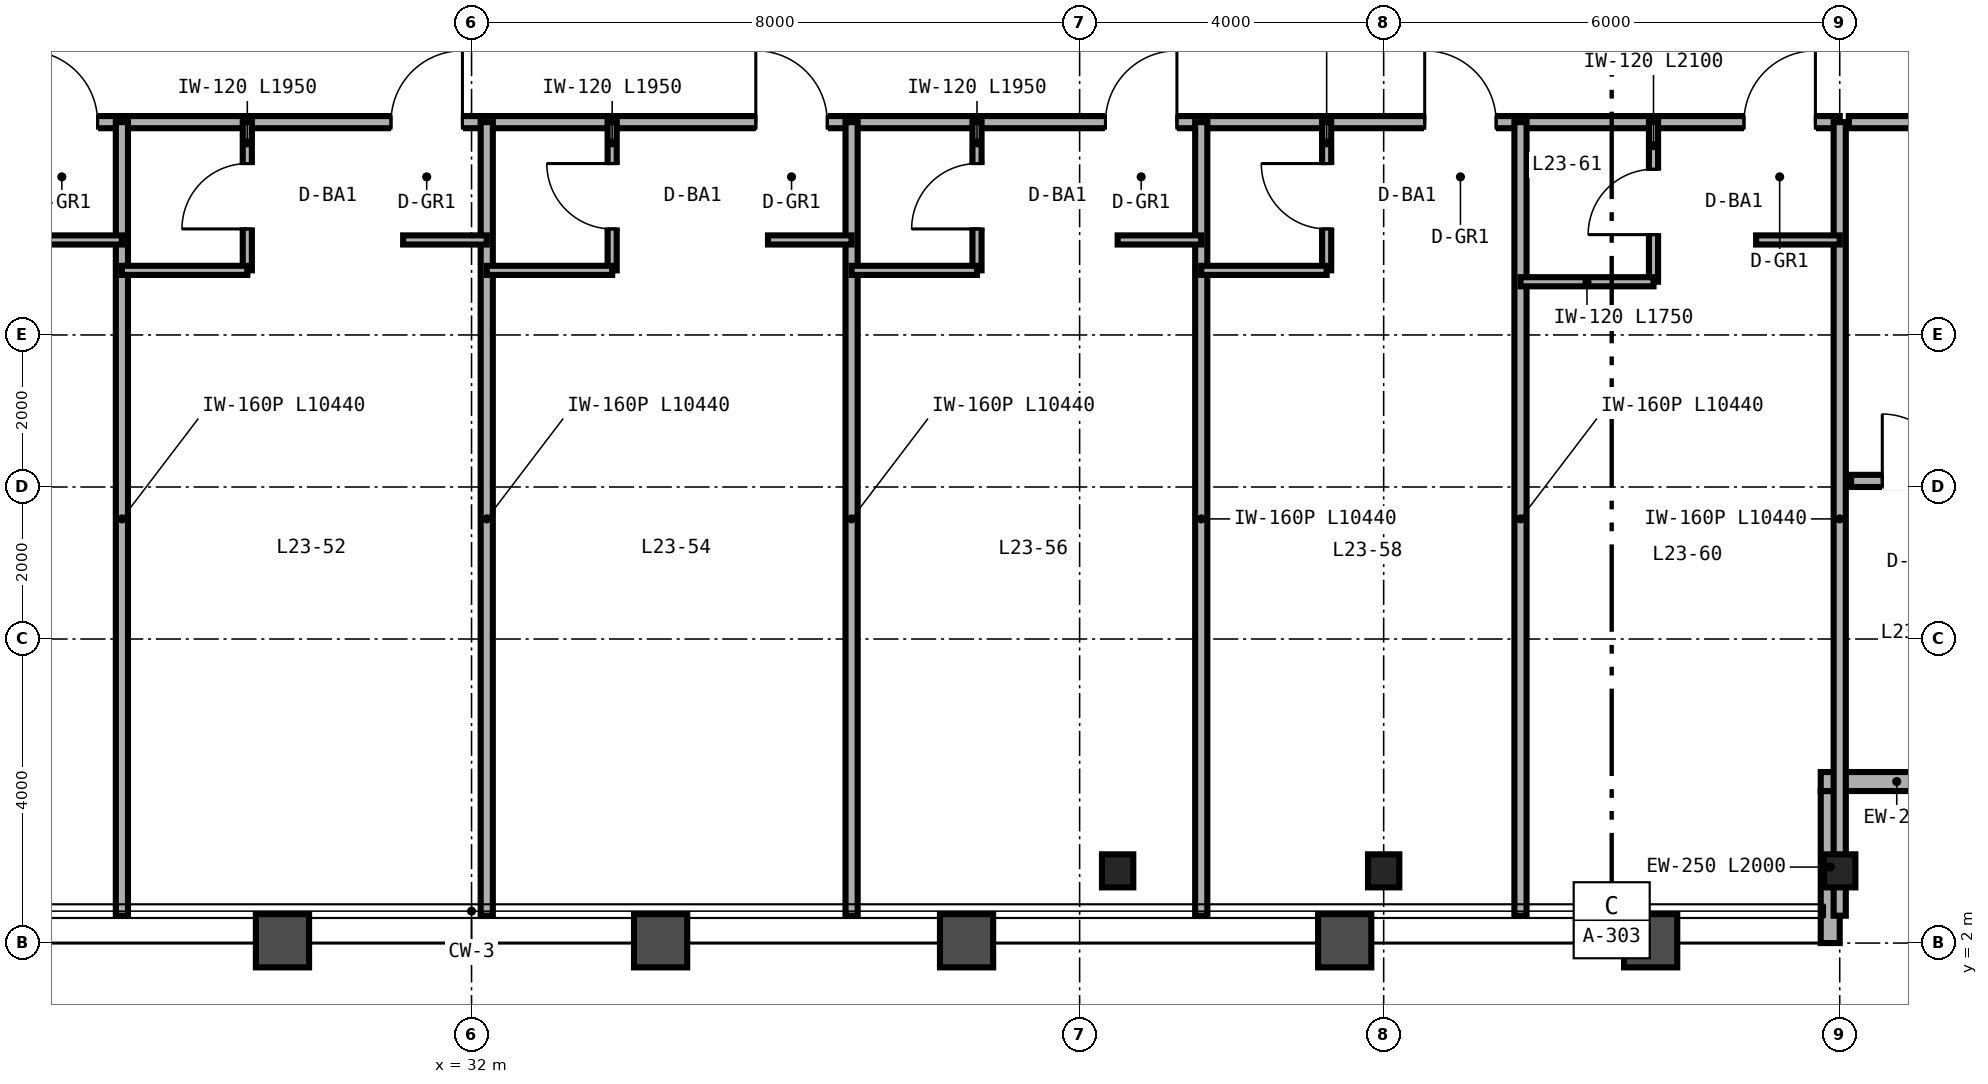
"""IFC4 building model, lengths in metres.
Left out: names, types, materials, properties, quantities, classifications, styles, units other than length and angle.
Written with IfcOpenShell. Run it as: python <this file> out.ifc"""

import sys

from ifc_helpers import new_model, si_unit, direction, frame, frame_2d, origin, origin_2d, place, context, subcontext, project, spatial, rectangle, i_section, extrude, source, transform, mapped, element, fill, save


model = new_model("IFC4")
c1 = context("Model", 3, precision=1e-05, world=origin(), true_north=direction((0.0, 1.0)))
c2 = subcontext(c1, "Body", "Model", "MODEL_VIEW")
j1 = project(units=[si_unit("LENGTHUNIT", "METRE"), si_unit("PLANEANGLEUNIT", "RADIAN")], contexts=[c1])
p1 = place(None, origin())
s1 = spatial("IfcSite", under=j1, at=p1, CompositionType="ELEMENT")
p2 = place(p1, origin())
s2 = spatial("IfcBuilding", under=s1, at=p2, CompositionType="ELEMENT")
p3 = place(p2, frame((0.0, 0.0, 97.2)))
s3 = spatial("IfcBuildingStorey", under=s2, at=p3, CompositionType="ELEMENT", Elevation=97.2)
m1 = source(origin(), c2, "Body", "SweptSolid", [
    extrude(i_section(OverallWidth=0.412, OverallDepth=0.435, WebThickness=0.036, FlangeThickness=0.057, FilletRadius=0.025, at=origin_2d()), origin(), (0.0, 0.0, 1.0), 3.36),
])
for number, where, z_axis, x_axis in (
    (1, (40.5, 2.95, 0.0), (0.0, 0.0, 1.0), (1.0, 0.0, 0.0)),
    (2, (44.0, 2.95, 0.0), (0.0, 0.0, 1.0), (1.0, 0.0, 0.0)),
    (3, (50.0, 2.95, 0.0), (0.0, 0.0, 1.0), (1.0, 0.0, 0.0)),
):
    element("IfcColumn", number, at=place(p3, frame(where, z_axis=z_axis, x_axis=x_axis)), inside=s3, PredefinedType="COLUMN", context=c2, shape_type="MappedRepresentation", body=[
        mapped(m1, transform((0.0, 0.0, 0.0), scale=1.0)),
    ])
p4 = place(p3, frame((49.875, 2.0, 0.0), z_axis=(0.0, 0.0, 1.0), x_axis=(0.0, 1.0, 0.0)))
e4 = element("IfcWall", 4, at=p4, inside=s3, PredefinedType="SOLIDWALL", context=c2, shape_type="SweptSolid", body=[
    extrude(rectangle(XDim=2.0, YDim=0.25, at=frame_2d((1.0, 0.0))), origin(), (0.0, 0.0, 1.0), 2.667),
])
p5 = place(p3, frame((49.75, 4.125, 0.0), z_axis=(0.0, 0.0, 1.0), x_axis=(1.0, 0.0, 0.0)))
e5 = element("IfcWall", 5, at=p5, inside=s3, PredefinedType="SOLIDWALL", context=c2, shape_type="SweptSolid", body=[
    extrude(rectangle(XDim=2.0, YDim=0.25, at=frame_2d((1.0, 0.0))), origin(), (0.0, 0.0, 1.0), 3.36),
])
p6 = place(p3, frame((50.12, 12.8, 0.0), z_axis=(0.0, 0.0, 1.0), x_axis=(1.0, 0.0, 0.0)))
e6 = element("IfcWall", 6, at=p6, inside=s3, PredefinedType="PARTITIONING", context=c2, shape_type="SweptSolid", body=[
    extrude(rectangle(XDim=5.68, YDim=0.16, at=frame_2d((2.84, 0.0))), origin(), (0.0, 0.0, 1.0), 3.36),
])
p7 = place(p6, frame((2.36, 0.0, 0.0)))
e7 = element("IfcOpeningElement", 7, at=p7, cuts=e6, PredefinedType="OPENING", context=c2, shape_type="SweptSolid", body=[
    extrude(rectangle(XDim=0.96, YDim=2.15, at=frame_2d((0.48, 1.075))), frame((0.0, 0.09, 0.0), z_axis=(0.0, -1.0, 0.0), x_axis=(1.0, 0.0, 0.0)), (0.0, 0.0, 1.0), 0.18),
])
p8 = place(p3, frame((50.15, 8.08, 0.0), z_axis=(0.0, 0.0, 1.0), x_axis=(1.0, 0.0, 0.0)))
e8 = element("IfcWall", 8, at=p8, inside=s3, PredefinedType="PARTITIONING", context=c2, shape_type="SweptSolid", body=[
    extrude(rectangle(XDim=1.7, YDim=0.16, at=frame_2d((0.85, 0.0))), origin(), (0.0, 0.0, 1.0), 3.36),
])
p9 = place(p8, frame((0.41, 0.0, 0.0)))
e9 = element("IfcOpeningElement", 9, at=p9, cuts=e8, PredefinedType="OPENING", context=c2, shape_type="SweptSolid", body=[
    extrude(rectangle(XDim=0.88, YDim=2.15, at=frame_2d((0.44, 1.075))), frame((0.0, 0.09, 0.0), z_axis=(0.0, -1.0, 0.0), x_axis=(1.0, 0.0, 0.0)), (0.0, 0.0, 1.0), 0.18),
])
p10 = place(p3, frame((14.0, 12.8, 0.0), z_axis=(0.0, 0.0, 1.0), x_axis=(1.0, 0.0, 0.0)))
e10 = element("IfcWall", 10, at=p10, inside=s3, PredefinedType="PARTITIONING", context=c2, shape_type="SweptSolid", body=[
    extrude(rectangle(XDim=36.0, YDim=0.16, at=frame_2d((18.0, 0.0))), origin(), (0.0, 0.0, 1.0), 2.581),
])
p11 = place(p10, frame((3.14, 0.0, 0.0)))
e11 = element("IfcOpeningElement", 11, at=p11, cuts=e10, PredefinedType="OPENING", context=c2, shape_type="SweptSolid", body=[
    extrude(rectangle(XDim=0.94, YDim=2.15, at=frame_2d((0.47, 1.075))), frame((0.0, 0.09, 0.0), z_axis=(0.0, -1.0, 0.0), x_axis=(1.0, 0.0, 0.0)), (0.0, 0.0, 1.0), 0.18),
])
p12 = place(p10, frame((7.54, 0.0, 0.0)))
e12 = element("IfcOpeningElement", 12, at=p12, cuts=e10, PredefinedType="OPENING", context=c2, shape_type="SweptSolid", body=[
    extrude(rectangle(XDim=0.94, YDim=2.15, at=frame_2d((0.47, 1.075))), frame((0.0, 0.09, 0.0), z_axis=(0.0, -1.0, 0.0), x_axis=(1.0, 0.0, 0.0)), (0.0, 0.0, 1.0), 0.18),
])
p13 = place(p10, frame((12.14, 0.0, 0.0)))
e13 = element("IfcOpeningElement", 13, at=p13, cuts=e10, PredefinedType="OPENING", context=c2, shape_type="SweptSolid", body=[
    extrude(rectangle(XDim=0.94, YDim=2.15, at=frame_2d((0.47, 1.075))), frame((0.0, 0.09, 0.0), z_axis=(0.0, -1.0, 0.0), x_axis=(1.0, 0.0, 0.0)), (0.0, 0.0, 1.0), 0.18),
])
p14 = place(p10, frame((16.94, 0.0, 0.0)))
e14 = element("IfcOpeningElement", 14, at=p14, cuts=e10, PredefinedType="OPENING", context=c2, shape_type="SweptSolid", body=[
    extrude(rectangle(XDim=0.94, YDim=2.15, at=frame_2d((0.47, 1.075))), frame((0.0, 0.09, 0.0), z_axis=(0.0, -1.0, 0.0), x_axis=(1.0, 0.0, 0.0)), (0.0, 0.0, 1.0), 0.18),
])
p15 = place(p10, frame((21.74, 0.0, 0.0)))
e15 = element("IfcOpeningElement", 15, at=p15, cuts=e10, PredefinedType="OPENING", context=c2, shape_type="SweptSolid", body=[
    extrude(rectangle(XDim=0.94, YDim=2.15, at=frame_2d((0.47, 1.075))), frame((0.0, 0.09, 0.0), z_axis=(0.0, -1.0, 0.0), x_axis=(1.0, 0.0, 0.0)), (0.0, 0.0, 1.0), 0.18),
])
p16 = place(p10, frame((26.34, 0.0, 0.0)))
e16 = element("IfcOpeningElement", 16, at=p16, cuts=e10, PredefinedType="OPENING", context=c2, shape_type="SweptSolid", body=[
    extrude(rectangle(XDim=0.94, YDim=2.15, at=frame_2d((0.47, 1.075))), frame((0.0, 0.09, 0.0), z_axis=(0.0, -1.0, 0.0), x_axis=(1.0, 0.0, 0.0)), (0.0, 0.0, 1.0), 0.18),
])
p17 = place(p10, frame((30.54, 0.0, 0.0)))
e17 = element("IfcOpeningElement", 17, at=p17, cuts=e10, PredefinedType="OPENING", context=c2, shape_type="SweptSolid", body=[
    extrude(rectangle(XDim=0.94, YDim=2.15, at=frame_2d((0.47, 1.075))), frame((0.0, 0.09, 0.0), z_axis=(0.0, -1.0, 0.0), x_axis=(1.0, 0.0, 0.0)), (0.0, 0.0, 1.0), 0.18),
])
p18 = place(p10, frame((34.74, 0.0, 0.0)))
e18 = element("IfcOpeningElement", 18, at=p18, cuts=e10, PredefinedType="OPENING", context=c2, shape_type="SweptSolid", body=[
    extrude(rectangle(XDim=0.94, YDim=2.15, at=frame_2d((0.47, 1.075))), frame((0.0, 0.09, 0.0), z_axis=(0.0, -1.0, 0.0), x_axis=(1.0, 0.0, 0.0)), (0.0, 0.0, 1.0), 0.18),
])
p19 = place(p3, frame((50.0, 2.36, 0.0), z_axis=(0.0, 0.0, 1.0), x_axis=(0.0, 1.0, 0.0)))
e19 = element("IfcWall", 19, at=p19, inside=s3, PredefinedType="PARTITIONING", context=c2, shape_type="SweptSolid", body=[
    extrude(rectangle(XDim=10.44, YDim=0.16, at=frame_2d((5.22, 0.0))), origin(), (0.0, 0.0, 1.0), 2.667),
])
p20 = place(p3, frame((27.4, 2.36, 0.0), z_axis=(0.0, 0.0, 1.0), x_axis=(0.0, 1.0, 0.0)))
e20 = element("IfcWall", 20, at=p20, inside=s3, PredefinedType="PARTITIONING", context=c2, shape_type="SweptSolid", body=[
    extrude(rectangle(XDim=10.44, YDim=0.16, at=frame_2d((5.22, 0.0))), origin(), (0.0, 0.0, 1.0), 2.433),
])
p21 = place(p3, frame((26.3, 11.25, 0.0), z_axis=(0.0, 0.0, 1.0), x_axis=(1.0, 0.0, 0.0)))
e21 = element("IfcWall", 21, at=p21, inside=s3, PredefinedType="PARTITIONING", context=c2, shape_type="SweptSolid", body=[
    extrude(rectangle(XDim=1.1, YDim=0.12, at=frame_2d((0.55, 0.0))), origin(), (0.0, 0.0, 1.0), 3.36),
])
p22 = place(p3, frame((32.2, 2.36, 0.0), z_axis=(0.0, 0.0, 1.0), x_axis=(0.0, 1.0, 0.0)))
e22 = element("IfcWall", 22, at=p22, inside=s3, PredefinedType="PARTITIONING", context=c2, shape_type="SweptSolid", body=[
    extrude(rectangle(XDim=10.44, YDim=0.16, at=frame_2d((5.22, 0.0))), origin(), (0.0, 0.0, 1.0), 2.433),
])
p23 = place(p3, frame((29.05, 10.85, 0.0), z_axis=(0.0, 0.0, 1.0), x_axis=(0.0, 1.0, 0.0)))
e23 = element("IfcWall", 23, at=p23, inside=s3, PredefinedType="PARTITIONING", context=c2, shape_type="SweptSolid", body=[
    extrude(rectangle(XDim=1.95, YDim=0.12, at=frame_2d((0.975, 0.0))), origin(), (0.0, 0.0, 1.0), 3.36),
])
p24 = place(p23, frame((0.545, 0.0, 0.0)))
e24 = element("IfcOpeningElement", 24, at=p24, cuts=e23, PredefinedType="OPENING", context=c2, shape_type="SweptSolid", body=[
    extrude(rectangle(XDim=0.86, YDim=2.1, at=frame_2d((0.43, 1.05))), frame((0.0, 0.07, 0.0), z_axis=(0.0, -1.0, 0.0), x_axis=(1.0, 0.0, 0.0)), (0.0, 0.0, 1.0), 0.14),
])
p25 = place(p3, frame((27.4, 10.85, 0.0), z_axis=(0.0, 0.0, 1.0), x_axis=(1.0, 0.0, 0.0)))
e25 = element("IfcWall", 25, at=p25, inside=s3, PredefinedType="PARTITIONING", context=c2, shape_type="SweptSolid", body=[
    extrude(rectangle(XDim=1.65, YDim=0.12, at=frame_2d((0.825, 0.0))), origin(), (0.0, 0.0, 1.0), 3.36),
])
p26 = place(p3, frame((31.1, 11.25, 0.0), z_axis=(0.0, 0.0, 1.0), x_axis=(1.0, 0.0, 0.0)))
e26 = element("IfcWall", 26, at=p26, inside=s3, PredefinedType="PARTITIONING", context=c2, shape_type="SweptSolid", body=[
    extrude(rectangle(XDim=1.1, YDim=0.12, at=frame_2d((0.55, 0.0))), origin(), (0.0, 0.0, 1.0), 3.36),
])
p27 = place(p3, frame((37.0, 2.36, 0.0), z_axis=(0.0, 0.0, 1.0), x_axis=(0.0, 1.0, 0.0)))
e27 = element("IfcWall", 27, at=p27, inside=s3, PredefinedType="PARTITIONING", context=c2, shape_type="SweptSolid", body=[
    extrude(rectangle(XDim=10.44, YDim=0.16, at=frame_2d((5.22, 0.0))), origin(), (0.0, 0.0, 1.0), 2.433),
])
p28 = place(p3, frame((33.85, 10.85, 0.0), z_axis=(0.0, 0.0, 1.0), x_axis=(0.0, 1.0, 0.0)))
e28 = element("IfcWall", 28, at=p28, inside=s3, PredefinedType="PARTITIONING", context=c2, shape_type="SweptSolid", body=[
    extrude(rectangle(XDim=1.95, YDim=0.12, at=frame_2d((0.975, 0.0))), origin(), (0.0, 0.0, 1.0), 3.36),
])
p29 = place(p28, frame((0.545, 0.0, 0.0)))
e29 = element("IfcOpeningElement", 29, at=p29, cuts=e28, PredefinedType="OPENING", context=c2, shape_type="SweptSolid", body=[
    extrude(rectangle(XDim=0.86, YDim=2.1, at=frame_2d((0.43, 1.05))), frame((0.0, 0.07, 0.0), z_axis=(0.0, -1.0, 0.0), x_axis=(1.0, 0.0, 0.0)), (0.0, 0.0, 1.0), 0.14),
])
p30 = place(p3, frame((32.2, 10.85, 0.0), z_axis=(0.0, 0.0, 1.0), x_axis=(1.0, 0.0, 0.0)))
e30 = element("IfcWall", 30, at=p30, inside=s3, PredefinedType="PARTITIONING", context=c2, shape_type="SweptSolid", body=[
    extrude(rectangle(XDim=1.65, YDim=0.12, at=frame_2d((0.825, 0.0))), origin(), (0.0, 0.0, 1.0), 3.36),
])
p31 = place(p3, frame((35.9, 11.25, 0.0), z_axis=(0.0, 0.0, 1.0), x_axis=(1.0, 0.0, 0.0)))
e31 = element("IfcWall", 31, at=p31, inside=s3, PredefinedType="PARTITIONING", context=c2, shape_type="SweptSolid", body=[
    extrude(rectangle(XDim=1.1, YDim=0.12, at=frame_2d((0.55, 0.0))), origin(), (0.0, 0.0, 1.0), 3.36),
])
p32 = place(p3, frame((41.6, 2.36, 0.0), z_axis=(0.0, 0.0, 1.0), x_axis=(0.0, 1.0, 0.0)))
e32 = element("IfcWall", 32, at=p32, inside=s3, PredefinedType="PARTITIONING", context=c2, shape_type="SweptSolid", body=[
    extrude(rectangle(XDim=10.44, YDim=0.16, at=frame_2d((5.22, 0.0))), origin(), (0.0, 0.0, 1.0), 2.823),
])
p33 = place(p3, frame((38.65, 10.85, 0.0), z_axis=(0.0, 0.0, 1.0), x_axis=(0.0, 1.0, 0.0)))
e33 = element("IfcWall", 33, at=p33, inside=s3, PredefinedType="PARTITIONING", context=c2, shape_type="SweptSolid", body=[
    extrude(rectangle(XDim=1.95, YDim=0.12, at=frame_2d((0.975, 0.0))), origin(), (0.0, 0.0, 1.0), 3.36),
])
p34 = place(p33, frame((0.545, 0.0, 0.0)))
e34 = element("IfcOpeningElement", 34, at=p34, cuts=e33, PredefinedType="OPENING", context=c2, shape_type="SweptSolid", body=[
    extrude(rectangle(XDim=0.86, YDim=2.1, at=frame_2d((0.43, 1.05))), frame((0.0, 0.07, 0.0), z_axis=(0.0, -1.0, 0.0), x_axis=(1.0, 0.0, 0.0)), (0.0, 0.0, 1.0), 0.14),
])
p35 = place(p3, frame((37.0, 10.85, 0.0), z_axis=(0.0, 0.0, 1.0), x_axis=(1.0, 0.0, 0.0)))
e35 = element("IfcWall", 35, at=p35, inside=s3, PredefinedType="PARTITIONING", context=c2, shape_type="SweptSolid", body=[
    extrude(rectangle(XDim=1.65, YDim=0.12, at=frame_2d((0.825, 0.0))), origin(), (0.0, 0.0, 1.0), 3.36),
])
p36 = place(p3, frame((40.5, 11.25, 0.0), z_axis=(0.0, 0.0, 1.0), x_axis=(1.0, 0.0, 0.0)))
e36 = element("IfcWall", 36, at=p36, inside=s3, PredefinedType="PARTITIONING", context=c2, shape_type="SweptSolid", body=[
    extrude(rectangle(XDim=1.1, YDim=0.12, at=frame_2d((0.55, 0.0))), origin(), (0.0, 0.0, 1.0), 2.581),
])
p37 = place(p3, frame((45.8, 2.36, 0.0), z_axis=(0.0, 0.0, 1.0), x_axis=(0.0, 1.0, 0.0)))
e37 = element("IfcWall", 37, at=p37, inside=s3, PredefinedType="PARTITIONING", context=c2, shape_type="SweptSolid", body=[
    extrude(rectangle(XDim=10.44, YDim=0.16, at=frame_2d((5.22, 0.0))), origin(), (0.0, 0.0, 1.0), 2.667),
])
p38 = place(p3, frame((43.25, 10.85, 0.0), z_axis=(0.0, 0.0, 1.0), x_axis=(0.0, 1.0, 0.0)))
e38 = element("IfcWall", 38, at=p38, inside=s3, PredefinedType="PARTITIONING", context=c2, shape_type="SweptSolid", body=[
    extrude(rectangle(XDim=1.95, YDim=0.12, at=frame_2d((0.975, 0.0))), origin(), (0.0, 0.0, 1.0), 3.36),
])
p39 = place(p38, frame((0.545, 0.0, 0.0)))
e39 = element("IfcOpeningElement", 39, at=p39, cuts=e38, PredefinedType="OPENING", context=c2, shape_type="SweptSolid", body=[
    extrude(rectangle(XDim=0.86, YDim=2.1, at=frame_2d((0.43, 1.05))), frame((0.0, 0.07, 0.0), z_axis=(0.0, -1.0, 0.0), x_axis=(1.0, 0.0, 0.0)), (0.0, 0.0, 1.0), 0.14),
])
p40 = place(p3, frame((41.6, 10.85, 0.0), z_axis=(0.0, 0.0, 1.0), x_axis=(1.0, 0.0, 0.0)))
e40 = element("IfcWall", 40, at=p40, inside=s3, PredefinedType="PARTITIONING", context=c2, shape_type="SweptSolid", body=[
    extrude(rectangle(XDim=1.65, YDim=0.12, at=frame_2d((0.825, 0.0))), origin(), (0.0, 0.0, 1.0), 3.36),
])
p41 = place(p3, frame((47.55, 10.7, 0.0), z_axis=(0.0, 0.0, 1.0), x_axis=(0.0, 1.0, 0.0)))
e41 = element("IfcWall", 41, at=p41, inside=s3, PredefinedType="PARTITIONING", context=c2, shape_type="SweptSolid", body=[
    extrude(rectangle(XDim=2.1, YDim=0.12, at=frame_2d((1.05, 0.0))), origin(), (0.0, 0.0, 1.0), 3.36),
])
p42 = place(p41, frame((0.62, 0.0, 0.0)))
e42 = element("IfcOpeningElement", 42, at=p42, cuts=e41, PredefinedType="OPENING", context=c2, shape_type="SweptSolid", body=[
    extrude(rectangle(XDim=0.86, YDim=2.1, at=frame_2d((0.43, 1.05))), frame((0.0, 0.07, 0.0), z_axis=(0.0, -1.0, 0.0), x_axis=(1.0, 0.0, 0.0)), (0.0, 0.0, 1.0), 0.14),
])
p43 = place(p3, frame((45.8, 10.7, 0.0), z_axis=(0.0, 0.0, 1.0), x_axis=(1.0, 0.0, 0.0)))
e43 = element("IfcWall", 43, at=p43, inside=s3, PredefinedType="PARTITIONING", context=c2, shape_type="SweptSolid", body=[
    extrude(rectangle(XDim=1.75, YDim=0.12, at=frame_2d((0.875, 0.0))), origin(), (0.0, 0.0, 1.0), 3.36),
])
p44 = place(p3, frame((48.9, 11.25, 0.0), z_axis=(0.0, 0.0, 1.0), x_axis=(1.0, 0.0, 0.0)))
e44 = element("IfcWall", 44, at=p44, inside=s3, PredefinedType="PARTITIONING", context=c2, shape_type="SweptSolid", body=[
    extrude(rectangle(XDim=1.1, YDim=0.12, at=frame_2d((0.55, 0.0))), origin(), (0.0, 0.0, 1.0), 3.36),
])
m2 = source(origin(), c2, "Body", "SweptSolid", [
    extrude(rectangle(XDim=0.88, YDim=2.15, at=frame_2d((0.44, 1.075))), frame((0.0, 0.025, 0.0), z_axis=(0.0, -1.0, 0.0), x_axis=(1.0, 0.0, 0.0)), (0.0, 0.0, 1.0), 0.05),
])
p45 = place(p9, origin())
e45 = element("IfcDoor", 45, at=p45, inside=s3, OperationType="SINGLE_SWING_LEFT", PredefinedType="DOOR", context=c2, shape_type="MappedRepresentation", body=[
    mapped(m2, transform((0.0, 0.0, 0.0), scale=1.0)),
])
fill(e9, e45)
m3 = source(origin(), c2, "Body", "SweptSolid", [
    extrude(rectangle(XDim=0.86, YDim=2.1, at=frame_2d((0.43, 1.05))), frame((0.0, 0.025, 0.0), z_axis=(0.0, -1.0, 0.0), x_axis=(1.0, 0.0, 0.0)), (0.0, 0.0, 1.0), 0.05),
])
p46 = place(p24, origin())
e46 = element("IfcDoor", 46, at=p46, inside=s3, OperationType="SINGLE_SWING_LEFT", PredefinedType="DOOR", context=c2, shape_type="MappedRepresentation", body=[
    mapped(m3, transform((0.0, 0.0, 0.0), scale=1.0)),
])
fill(e24, e46)
p47 = place(p29, origin())
e47 = element("IfcDoor", 47, at=p47, inside=s3, OperationType="SINGLE_SWING_RIGHT", PredefinedType="DOOR", context=c2, shape_type="MappedRepresentation", body=[
    mapped(m3, transform((0.0, 0.0, 0.0), scale=1.0)),
])
fill(e29, e47)
p48 = place(p34, origin())
e48 = element("IfcDoor", 48, at=p48, inside=s3, OperationType="SINGLE_SWING_LEFT", PredefinedType="DOOR", context=c2, shape_type="MappedRepresentation", body=[
    mapped(m3, transform((0.0, 0.0, 0.0), scale=1.0)),
])
fill(e34, e48)
p49 = place(p39, origin())
e49 = element("IfcDoor", 49, at=p49, inside=s3, OperationType="SINGLE_SWING_RIGHT", PredefinedType="DOOR", context=c2, shape_type="MappedRepresentation", body=[
    mapped(m3, transform((0.0, 0.0, 0.0), scale=1.0)),
])
fill(e39, e49)
p50 = place(p42, origin())
e50 = element("IfcDoor", 50, at=p50, inside=s3, OperationType="SINGLE_SWING_LEFT", PredefinedType="DOOR", context=c2, shape_type="MappedRepresentation", body=[
    mapped(m3, transform((0.0, 0.0, 0.0), scale=1.0)),
])
fill(e42, e50)
m4 = source(origin(), c2, "Body", "SweptSolid", [
    extrude(rectangle(XDim=0.94, YDim=2.15, at=frame_2d((0.47, 1.075))), frame((0.0, 0.025, 0.0), z_axis=(0.0, -1.0, 0.0), x_axis=(1.0, 0.0, 0.0)), (0.0, 0.0, 1.0), 0.05),
])
p51 = place(p13, origin())
e51 = element("IfcDoor", 51, at=p51, inside=s3, OperationType="SINGLE_SWING_LEFT", PredefinedType="DOOR", context=c2, shape_type="MappedRepresentation", body=[
    mapped(m4, transform((0.0, 0.0, 0.0), scale=1.0)),
])
fill(e13, e51)
p52 = place(p14, origin())
e52 = element("IfcDoor", 52, at=p52, inside=s3, OperationType="SINGLE_SWING_RIGHT", PredefinedType="DOOR", context=c2, shape_type="MappedRepresentation", body=[
    mapped(m4, transform((0.0, 0.0, 0.0), scale=1.0)),
])
fill(e14, e52)
p53 = place(p15, origin())
e53 = element("IfcDoor", 53, at=p53, inside=s3, OperationType="SINGLE_SWING_LEFT", PredefinedType="DOOR", context=c2, shape_type="MappedRepresentation", body=[
    mapped(m4, transform((0.0, 0.0, 0.0), scale=1.0)),
])
fill(e15, e53)
p54 = place(p16, origin())
e54 = element("IfcDoor", 54, at=p54, inside=s3, OperationType="SINGLE_SWING_RIGHT", PredefinedType="DOOR", context=c2, shape_type="MappedRepresentation", body=[
    mapped(m4, transform((0.0, 0.0, 0.0), scale=1.0)),
])
fill(e16, e54)
p55 = place(p17, origin())
e55 = element("IfcDoor", 55, at=p55, inside=s3, OperationType="SINGLE_SWING_LEFT", PredefinedType="DOOR", context=c2, shape_type="MappedRepresentation", body=[
    mapped(m4, transform((0.0, 0.0, 0.0), scale=1.0)),
])
fill(e17, e55)
p56 = place(p18, origin())
e56 = element("IfcDoor", 56, at=p56, inside=s3, OperationType="SINGLE_SWING_RIGHT", PredefinedType="DOOR", context=c2, shape_type="MappedRepresentation", body=[
    mapped(m4, transform((0.0, 0.0, 0.0), scale=1.0)),
])
fill(e18, e56)
save(model, sys.argv[1])
